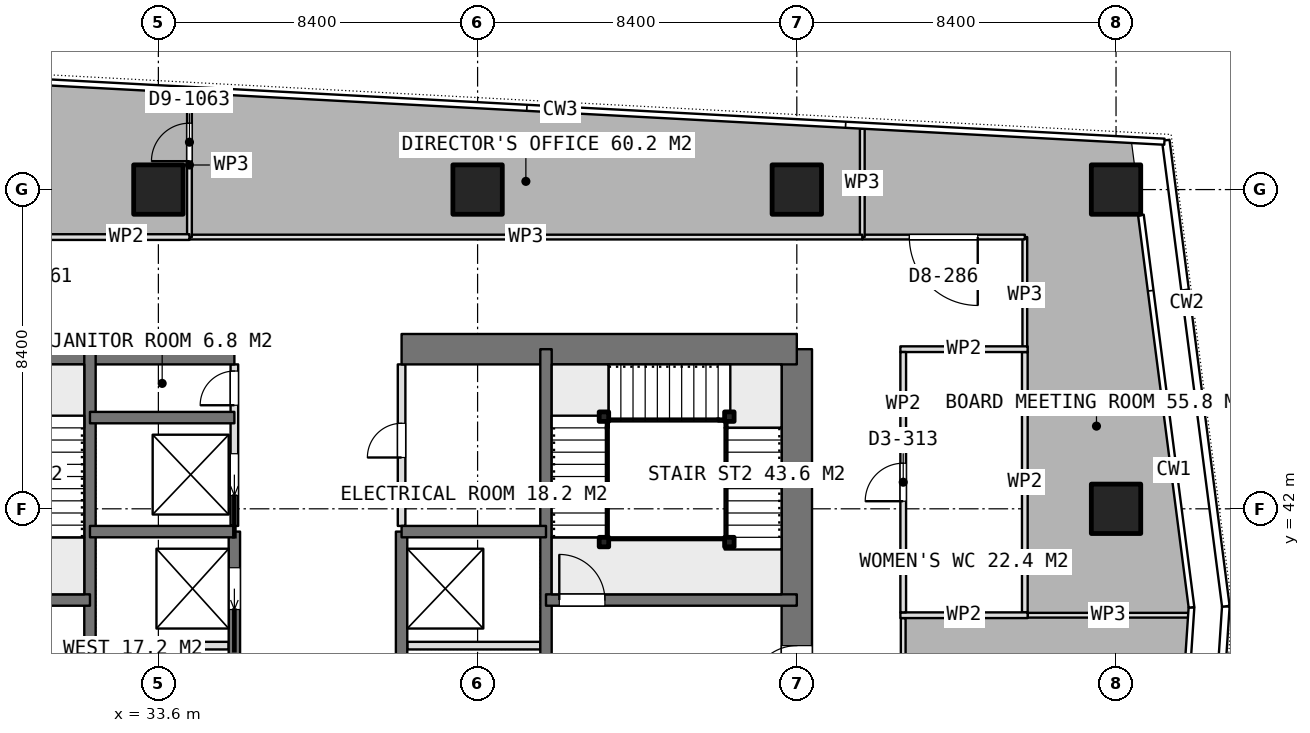
"""IFC4 building model, lengths in metres.
Left out: names, types, materials, properties, quantities, classifications, styles, units other than length and angle.
Written with IfcOpenShell. Run it as: python <this file> out.ifc"""

import sys

from ifc_helpers import new_model, si_unit, direction, frame, frame_2d, origin, origin_2d, place, context, subcontext, project, spatial, rectangle, extrude, element, fill, save


model = new_model("IFC4")
c1 = context("Model", 3, precision=1e-05, world=origin(), true_north=direction((0.0, 1.0)))
c2 = subcontext(c1, "Body", "Model", "MODEL_VIEW")
j1 = project(units=[si_unit("LENGTHUNIT", "METRE"), si_unit("PLANEANGLEUNIT", "RADIAN")], contexts=[c1])
p1 = place(None, origin())
s1 = spatial("IfcSite", under=j1, at=p1, CompositionType="ELEMENT")
p2 = place(p1, origin())
s2 = spatial("IfcBuilding", under=s1, at=p2, CompositionType="ELEMENT")
p3 = place(p2, frame((0.0, 0.0, 287.6)))
s3 = spatial("IfcBuildingStorey", under=s2, at=p3, CompositionType="ELEMENT", Elevation=287.6)
p4 = place(p3, frame((25.2, 46.2, 0.0), z_axis=(0.0, 0.0, 1.0), x_axis=(1.0, 0.0, 0.0)))
e1 = element("IfcWall", 1, at=p4, inside=s3, PredefinedType="SHEAR", context=c2, shape_type="SweptSolid", body=[
    extrude(rectangle(XDim=10.4, YDim=0.8, at=frame_2d((5.2, 0.0))), origin(), (0.0, 0.0, 1.0), 3.75),
])
p5 = place(p3, frame((40.0, 46.2, 0.0), z_axis=(0.0, 0.0, 1.0), x_axis=(1.0, 0.0, 0.0)))
e2 = element("IfcWall", 2, at=p5, inside=s3, PredefinedType="SHEAR", context=c2, shape_type="SweptSolid", body=[
    extrude(rectangle(XDim=10.4, YDim=0.8, at=frame_2d((5.2, 0.0))), origin(), (0.0, 0.0, 1.0), 3.75),
])
p6 = place(p3, frame((50.4, 21.0, 0.0), z_axis=(0.0, 0.0, 1.0), x_axis=(0.0, 1.0, 0.0)))
e3 = element("IfcWall", 3, at=p6, inside=s3, PredefinedType="SHEAR", context=c2, shape_type="SweptSolid", body=[
    extrude(rectangle(XDim=25.2, YDim=0.8, at=frame_2d((12.6, 0.0))), origin(), (0.0, 0.0, 1.0), 3.75),
])
p7 = place(p6, frame((16.2, 0.0, 0.0)))
e4 = element("IfcOpeningElement", 4, at=p7, cuts=e3, PredefinedType="OPENING", context=c2, shape_type="SweptSolid", body=[
    extrude(rectangle(XDim=1.2, YDim=2.1, at=frame_2d((0.6, 1.05))), frame((0.0, 0.41, 0.0), z_axis=(0.0, -1.0, 0.0), x_axis=(1.0, 0.0, 0.0)), (0.0, 0.0, 1.0), 0.82),
])
p8 = place(p6, frame((10.05, 0.0, 0.0)))
e5 = element("IfcOpeningElement", 5, at=p8, cuts=e3, PredefinedType="OPENING", context=c2, shape_type="SweptSolid", body=[
    extrude(rectangle(XDim=0.9, YDim=2.1, at=frame_2d((0.45, 1.05))), frame((0.0, 0.41, 0.0), z_axis=(0.0, -1.0, 0.0), x_axis=(1.0, 0.0, 0.0)), (0.0, 0.0, 1.0), 0.82),
])
p9 = place(p6, frame((7.45, 0.0, 0.0)))
e6 = element("IfcOpeningElement", 6, at=p9, cuts=e3, PredefinedType="OPENING", context=c2, shape_type="SweptSolid", body=[
    extrude(rectangle(XDim=0.9, YDim=2.1, at=frame_2d((0.45, 1.05))), frame((0.0, 0.41, 0.0), z_axis=(0.0, -1.0, 0.0), x_axis=(1.0, 0.0, 0.0)), (0.0, 0.0, 1.0), 0.82),
])
p10 = place(p6, frame((0.6, 0.0, 0.0)))
e7 = element("IfcOpeningElement", 7, at=p10, cuts=e3, PredefinedType="OPENING", context=c2, shape_type="SweptSolid", body=[
    extrude(rectangle(XDim=1.2, YDim=2.1, at=frame_2d((0.6, 1.05))), frame((0.0, 0.41, 0.0), z_axis=(0.0, -1.0, 0.0), x_axis=(1.0, 0.0, 0.0)), (0.0, 0.0, 1.0), 0.82),
])
for number, where, z_axis, x_axis in (
    (8, (31.8, 21.0, 0.0), (0.0, 0.0, 1.0), (0.0, 1.0, 0.0)),
    (9, (43.8, 21.0, 0.0), (0.0, 0.0, 1.0), (0.0, 1.0, 0.0)),
):
    element("IfcWall", number, at=place(p3, frame(where, z_axis=z_axis, x_axis=x_axis)), inside=s3, PredefinedType="SHEAR", context=c2, shape_type="SweptSolid", body=[
        extrude(rectangle(XDim=25.2, YDim=0.3, at=frame_2d((12.6, 0.0))), origin(), (0.0, 0.0, 1.0), 3.75),
    ])
p11 = place(p3, frame((35.6, 23.4, 0.0), z_axis=(0.0, 0.0, 1.0), x_axis=(0.0, 1.0, 0.0)))
e10 = element("IfcWall", 10, at=p11, inside=s3, PredefinedType="SHEAR", context=c2, shape_type="SweptSolid", body=[
    extrude(rectangle(XDim=18.0, YDim=0.3, at=frame_2d((9.0, 0.0))), origin(), (0.0, 0.0, 1.0), 3.75),
])
p12 = place(p11, frame((0.95, 0.0, 0.0)))
e11 = element("IfcOpeningElement", 11, at=p12, cuts=e10, PredefinedType="OPENING", context=c2, shape_type="SweptSolid", body=[
    extrude(rectangle(XDim=1.1, YDim=2.1, at=frame_2d((0.55, 1.05))), frame((0.0, 0.16, 0.0), z_axis=(0.0, -1.0, 0.0), x_axis=(1.0, 0.0, 0.0)), (0.0, 0.0, 1.0), 0.32),
])
p13 = place(p11, frame((3.95, 0.0, 0.0)))
e12 = element("IfcOpeningElement", 12, at=p13, cuts=e10, PredefinedType="OPENING", context=c2, shape_type="SweptSolid", body=[
    extrude(rectangle(XDim=1.1, YDim=2.1, at=frame_2d((0.55, 1.05))), frame((0.0, 0.16, 0.0), z_axis=(0.0, -1.0, 0.0), x_axis=(1.0, 0.0, 0.0)), (0.0, 0.0, 1.0), 0.32),
])
p14 = place(p11, frame((6.95, 0.0, 0.0)))
e13 = element("IfcOpeningElement", 13, at=p14, cuts=e10, PredefinedType="OPENING", context=c2, shape_type="SweptSolid", body=[
    extrude(rectangle(XDim=1.1, YDim=2.1, at=frame_2d((0.55, 1.05))), frame((0.0, 0.16, 0.0), z_axis=(0.0, -1.0, 0.0), x_axis=(1.0, 0.0, 0.0)), (0.0, 0.0, 1.0), 0.32),
])
p15 = place(p11, frame((9.95, 0.0, 0.0)))
e14 = element("IfcOpeningElement", 14, at=p15, cuts=e10, PredefinedType="OPENING", context=c2, shape_type="SweptSolid", body=[
    extrude(rectangle(XDim=1.1, YDim=2.1, at=frame_2d((0.55, 1.05))), frame((0.0, 0.16, 0.0), z_axis=(0.0, -1.0, 0.0), x_axis=(1.0, 0.0, 0.0)), (0.0, 0.0, 1.0), 0.32),
])
p16 = place(p11, frame((12.95, 0.0, 0.0)))
e15 = element("IfcOpeningElement", 15, at=p16, cuts=e10, PredefinedType="OPENING", context=c2, shape_type="SweptSolid", body=[
    extrude(rectangle(XDim=1.1, YDim=2.1, at=frame_2d((0.55, 1.05))), frame((0.0, 0.16, 0.0), z_axis=(0.0, -1.0, 0.0), x_axis=(1.0, 0.0, 0.0)), (0.0, 0.0, 1.0), 0.32),
])
p17 = place(p11, frame((15.95, 0.0, 0.0)))
e16 = element("IfcOpeningElement", 16, at=p17, cuts=e10, PredefinedType="OPENING", context=c2, shape_type="SweptSolid", body=[
    extrude(rectangle(XDim=1.1, YDim=2.1, at=frame_2d((0.55, 1.05))), frame((0.0, 0.16, 0.0), z_axis=(0.0, -1.0, 0.0), x_axis=(1.0, 0.0, 0.0)), (0.0, 0.0, 1.0), 0.32),
])
p18 = place(p3, frame((40.0, 23.4, 0.0), z_axis=(0.0, 0.0, 1.0), x_axis=(0.0, 1.0, 0.0)))
e17 = element("IfcWall", 17, at=p18, inside=s3, PredefinedType="SHEAR", context=c2, shape_type="SweptSolid", body=[
    extrude(rectangle(XDim=18.0, YDim=0.3, at=frame_2d((9.0, 0.0))), origin(), (0.0, 0.0, 1.0), 3.75),
])
p19 = place(p18, frame((2.55, 0.0, 0.0)))
e18 = element("IfcOpeningElement", 18, at=p19, cuts=e17, PredefinedType="OPENING", context=c2, shape_type="SweptSolid", body=[
    extrude(rectangle(XDim=0.9, YDim=2.1, at=frame_2d((0.45, 1.05))), frame((0.0, 0.16, 0.0), z_axis=(0.0, -1.0, 0.0), x_axis=(1.0, 0.0, 0.0)), (0.0, 0.0, 1.0), 0.32),
])
p20 = place(p18, frame((8.55, 0.0, 0.0)))
e19 = element("IfcOpeningElement", 19, at=p20, cuts=e17, PredefinedType="OPENING", context=c2, shape_type="SweptSolid", body=[
    extrude(rectangle(XDim=0.9, YDim=2.1, at=frame_2d((0.45, 1.05))), frame((0.0, 0.16, 0.0), z_axis=(0.0, -1.0, 0.0), x_axis=(1.0, 0.0, 0.0)), (0.0, 0.0, 1.0), 0.32),
])
for number, where, z_axis, x_axis in (
    (20, (31.8, 41.4, 0.0), (0.0, 0.0, 1.0), (1.0, 0.0, 0.0)),
    (21, (31.8, 44.4, 0.0), (0.0, 0.0, 1.0), (1.0, 0.0, 0.0)),
    (22, (40.0, 41.4, 0.0), (0.0, 0.0, 1.0), (1.0, 0.0, 0.0)),
):
    element("IfcWall", number, at=place(p3, frame(where, z_axis=z_axis, x_axis=x_axis)), inside=s3, PredefinedType="SHEAR", context=c2, shape_type="SweptSolid", body=[
        extrude(rectangle(XDim=3.8, YDim=0.3, at=frame_2d((1.9, 0.0))), origin(), (0.0, 0.0, 1.0), 3.75),
    ])
p21 = place(p3, frame((25.2, 39.6, 0.0), z_axis=(0.0, 0.0, 1.0), x_axis=(1.0, 0.0, 0.0)))
e23 = element("IfcWall", 23, at=p21, inside=s3, PredefinedType="SHEAR", context=c2, shape_type="SweptSolid", body=[
    extrude(rectangle(XDim=6.6, YDim=0.3, at=frame_2d((3.3, 0.0))), origin(), (0.0, 0.0, 1.0), 3.75),
])
p22 = place(p3, frame((43.8, 39.6, 0.0), z_axis=(0.0, 0.0, 1.0), x_axis=(1.0, 0.0, 0.0)))
e24 = element("IfcWall", 24, at=p22, inside=s3, PredefinedType="SHEAR", context=c2, shape_type="SweptSolid", body=[
    extrude(rectangle(XDim=6.6, YDim=0.3, at=frame_2d((3.3, 0.0))), origin(), (0.0, 0.0, 1.0), 3.75),
])
p23 = place(p22, frame((0.35, 0.0, 0.0)))
e25 = element("IfcOpeningElement", 25, at=p23, cuts=e24, PredefinedType="OPENING", context=c2, shape_type="SweptSolid", body=[
    extrude(rectangle(XDim=1.2, YDim=2.1, at=frame_2d((0.6, 1.05))), frame((0.0, 0.16, 0.0), z_axis=(0.0, -1.0, 0.0), x_axis=(1.0, 0.0, 0.0)), (0.0, 0.0, 1.0), 0.32),
])
for number, where, z_axis, x_axis in (
    (26, (33.6, 50.4, 0.0), (0.0, 0.0, 1.0), (1.0, 0.0, 0.0)),
    (27, (42.0, 50.4, 0.0), (0.0, 0.0, 1.0), (1.0, 0.0, 0.0)),
    (28, (50.4, 50.4, 0.0), (0.0, 0.0, 1.0), (1.0, 0.0, 0.0)),
    (29, (58.8, 42.0, 0.0), (0.0, 0.0, 1.0), (1.0, 0.0, 0.0)),
    (30, (58.8, 50.4, 0.0), (0.0, 0.0, 1.0), (1.0, 0.0, 0.0)),
):
    element("IfcColumn", number, at=place(p3, frame(where, z_axis=z_axis, x_axis=x_axis)), inside=s3, PredefinedType="COLUMN", context=c2, shape_type="SweptSolid", body=[
        extrude(rectangle(XDim=1.3, YDim=1.3, at=origin_2d()), origin(), (0.0, 0.0, 1.0), 3.75),
    ])
for number, where, z_axis, x_axis in (
    (31, (31.95, 38.4, 0.0), (0.0, 0.0, 1.0), (1.0, 0.0, 0.0)),
    (32, (40.15, 38.4, 0.0), (0.0, 0.0, 1.0), (1.0, 0.0, 0.0)),
):
    element("IfcWall", number, at=place(p3, frame(where, z_axis=z_axis, x_axis=x_axis)), inside=s3, PredefinedType="PARTITIONING", context=c2, shape_type="SweptSolid", body=[
        extrude(rectangle(XDim=3.5, YDim=0.2, at=frame_2d((1.75, 0.0))), origin(), (0.0, 0.0, 1.0), 3.45),
    ])
p24 = place(p3, frame((40.0, 41.55, 0.0), z_axis=(0.0, 0.0, 1.0), x_axis=(0.0, 1.0, 0.0)))
e33 = element("IfcWall", 33, at=p24, inside=s3, PredefinedType="PARTITIONING", context=c2, shape_type="SweptSolid", body=[
    extrude(rectangle(XDim=4.25, YDim=0.2, at=frame_2d((2.125, 0.0))), origin(), (0.0, 0.0, 1.0), 3.45),
])
p25 = place(p24, frame((1.8, 0.0, 0.0)))
e34 = element("IfcOpeningElement", 34, at=p25, cuts=e33, PredefinedType="OPENING", context=c2, shape_type="SweptSolid", body=[
    extrude(rectangle(XDim=0.9, YDim=2.1, at=frame_2d((0.45, 1.05))), frame((0.0, 0.11, 0.0), z_axis=(0.0, -1.0, 0.0), x_axis=(1.0, 0.0, 0.0)), (0.0, 0.0, 1.0), 0.22),
])
p26 = place(p3, frame((35.6, 41.55, 0.0), z_axis=(0.0, 0.0, 1.0), x_axis=(0.0, 1.0, 0.0)))
e35 = element("IfcWall", 35, at=p26, inside=s3, PredefinedType="PARTITIONING", context=c2, shape_type="SweptSolid", body=[
    extrude(rectangle(XDim=4.25, YDim=0.2, at=frame_2d((2.125, 0.0))), origin(), (0.0, 0.0, 1.0), 3.45),
])
p27 = place(p26, frame((3.175, 0.0, 0.0)))
e36 = element("IfcOpeningElement", 36, at=p27, cuts=e35, PredefinedType="OPENING", context=c2, shape_type="SweptSolid", body=[
    extrude(rectangle(XDim=0.9, YDim=2.1, at=frame_2d((0.45, 1.05))), frame((0.0, 0.11, 0.0), z_axis=(0.0, -1.0, 0.0), x_axis=(1.0, 0.0, 0.0)), (0.0, 0.0, 1.0), 0.22),
])
p28 = place(p26, frame((0.8, 0.0, 0.0)))
e37 = element("IfcOpeningElement", 37, at=p28, cuts=e35, PredefinedType="OPENING", context=c2, shape_type="SweptSolid", body=[
    extrude(rectangle(XDim=1.1, YDim=2.1, at=frame_2d((0.55, 1.05))), frame((0.0, 0.11, 0.0), z_axis=(0.0, -1.0, 0.0), x_axis=(1.0, 0.0, 0.0)), (0.0, 0.0, 1.0), 0.22),
])
for number, where, z_axis, x_axis in (
    (38, (53.125, 39.2, 0.0), (0.0, 0.0, 1.0), (1.0, 0.0, 0.0)),
    (39, (53.125, 46.2, 0.0), (0.0, 0.0, 1.0), (1.0, 0.0, 0.0)),
):
    element("IfcWall", number, at=place(p3, frame(where, z_axis=z_axis, x_axis=x_axis)), inside=s3, PredefinedType="PARTITIONING", context=c2, shape_type="SweptSolid", body=[
        extrude(rectangle(XDim=3.35, YDim=0.15, at=frame_2d((1.675, 0.0))), origin(), (0.0, 0.0, 1.0), 3.45),
    ])
p29 = place(p3, frame((53.2, 39.275, 0.0), z_axis=(0.0, 0.0, 1.0), x_axis=(0.0, 1.0, 0.0)))
e40 = element("IfcWall", 40, at=p29, inside=s3, PredefinedType="PARTITIONING", context=c2, shape_type="SweptSolid", body=[
    extrude(rectangle(XDim=6.85, YDim=0.15, at=frame_2d((3.425, 0.0))), origin(), (0.0, 0.0, 1.0), 3.45),
])
p30 = place(p29, frame((2.925, 0.0, 0.0)))
e41 = element("IfcOpeningElement", 41, at=p30, cuts=e40, PredefinedType="OPENING", context=c2, shape_type="SweptSolid", body=[
    extrude(rectangle(XDim=1.0, YDim=2.1, at=frame_2d((0.5, 1.05))), frame((0.0, 0.085, 0.0), z_axis=(0.0, -1.0, 0.0), x_axis=(1.0, 0.0, 0.0)), (0.0, 0.0, 1.0), 0.17),
])
p31 = place(p3, frame((56.4, 39.275, 0.0), z_axis=(0.0, 0.0, 1.0), x_axis=(0.0, 1.0, 0.0)))
e42 = element("IfcWall", 42, at=p31, inside=s3, PredefinedType="PARTITIONING", context=c2, shape_type="SweptSolid", body=[
    extrude(rectangle(XDim=6.85, YDim=0.15, at=frame_2d((3.425, 0.0))), origin(), (0.0, 0.0, 1.0), 3.45),
])
p32 = place(p3, frame((53.2, 28.075, 0.0), z_axis=(0.0, 0.0, 1.0), x_axis=(0.0, 1.0, 0.0)))
e43 = element("IfcWall", 43, at=p32, inside=s3, PredefinedType="PARTITIONING", context=c2, shape_type="SweptSolid", body=[
    extrude(rectangle(XDim=11.05, YDim=0.125, at=frame_2d((5.525, 0.0))), origin(), (0.0, 0.0, 1.0), 3.45),
])
p33 = place(p32, frame((5.025, 0.0, 0.0)))
e44 = element("IfcOpeningElement", 44, at=p33, cuts=e43, PredefinedType="OPENING", context=c2, shape_type="SweptSolid", body=[
    extrude(rectangle(XDim=1.0, YDim=2.1, at=frame_2d((0.5, 1.05))), frame((0.0, 0.073, 0.0), z_axis=(0.0, -1.0, 0.0), x_axis=(1.0, 0.0, 0.0)), (0.0, 0.0, 1.0), 0.145),
])
p34 = place(p3, frame((56.476, 39.2, 0.0), z_axis=(0.0, 0.0, 1.0), x_axis=(1.0, 0.0, 0.0)))
e45 = element("IfcWall", 45, at=p34, inside=s3, PredefinedType="PARTITIONING", context=c2, shape_type="SweptSolid", body=[
    extrude(rectangle(XDim=4.246, YDim=0.125, at=frame_2d((2.123, 0.0))), origin(), (0.0, 0.0, 1.0), 3.45),
])
p35 = place(p3, frame((56.4, 46.125, 0.0), z_axis=(0.0, 0.0, 1.0), x_axis=(0.0, 1.0, 0.0)))
e46 = element("IfcWall", 46, at=p35, inside=s3, PredefinedType="PARTITIONING", context=c2, shape_type="SweptSolid", body=[
    extrude(rectangle(XDim=3.025, YDim=0.125, at=frame_2d((1.512, 0.0))), origin(), (0.0, 0.0, 1.0), 3.45),
])
p36 = place(p3, frame((56.4, 49.15, 0.0), z_axis=(0.0, 0.0, 1.0), x_axis=(-1.0, 0.0, 0.0)))
e47 = element("IfcWall", 47, at=p36, inside=s3, PredefinedType="PARTITIONING", context=c2, shape_type="SweptSolid", body=[
    extrude(rectangle(XDim=4.277, YDim=0.125, at=frame_2d((2.138, 0.0))), origin(), (0.0, 0.0, 1.0), 3.45),
])
p37 = place(p36, frame((1.239, 0.0, 0.0)))
e48 = element("IfcOpeningElement", 48, at=p37, cuts=e47, PredefinedType="OPENING", context=c2, shape_type="SweptSolid", body=[
    extrude(rectangle(XDim=1.8, YDim=2.1, at=frame_2d((0.9, 1.05))), frame((0.0, 0.073, 0.0), z_axis=(0.0, -1.0, 0.0), x_axis=(1.0, 0.0, 0.0)), (0.0, 0.0, 1.0), 0.145),
])
p38 = place(p3, frame((52.123, 49.15, 0.0), z_axis=(0.0, 0.0, 1.0), x_axis=(0.0, 1.0, 0.0)))
e49 = element("IfcWall", 49, at=p38, inside=s3, PredefinedType="PARTITIONING", context=c2, shape_type="SweptSolid", body=[
    extrude(rectangle(XDim=2.852, YDim=0.125, at=frame_2d((1.426, 0.0))), origin(), (0.0, 0.0, 1.0), 3.45),
])
p39 = place(p3, frame((52.123, 49.15, 0.0), z_axis=(0.0, 0.0, 1.0), x_axis=(-1.0, 0.0, 0.0)))
e50 = element("IfcWall", 50, at=p39, inside=s3, PredefinedType="PARTITIONING", context=c2, shape_type="SweptSolid", body=[
    extrude(rectangle(XDim=17.705, YDim=0.125, at=frame_2d((8.853, 0.0))), origin(), (0.0, 0.0, 1.0), 3.45),
])
p40 = place(p3, frame((34.418, 49.15, 0.0), z_axis=(0.0, 0.0, 1.0), x_axis=(0.0, 1.0, 0.0)))
e51 = element("IfcWall", 51, at=p40, inside=s3, PredefinedType="PARTITIONING", context=c2, shape_type="SweptSolid", body=[
    extrude(rectangle(XDim=3.793, YDim=0.125, at=frame_2d((1.896, 0.0))), origin(), (0.0, 0.0, 1.0), 3.45),
])
p41 = place(p40, frame((1.997, 0.0, 0.0)))
e52 = element("IfcOpeningElement", 52, at=p41, cuts=e51, PredefinedType="OPENING", context=c2, shape_type="SweptSolid", body=[
    extrude(rectangle(XDim=1.0, YDim=2.1, at=frame_2d((0.5, 1.05))), frame((0.0, 0.073, 0.0), z_axis=(0.0, -1.0, 0.0), x_axis=(1.0, 0.0, 0.0)), (0.0, 0.0, 1.0), 0.145),
])
p42 = place(p3, frame((34.418, 49.15, 0.0), z_axis=(0.0, 0.0, 1.0), x_axis=(-1.0, 0.0, 0.0)))
e53 = element("IfcWall", 53, at=p42, inside=s3, PredefinedType="PARTITIONING", context=c2, shape_type="SweptSolid", body=[
    extrude(rectangle(XDim=8.299, YDim=0.15, at=frame_2d((4.149, 0.0))), origin(), (0.0, 0.0, 1.0), 3.45),
])
p43 = place(p42, frame((3.649, 0.0, 0.0)))
e54 = element("IfcOpeningElement", 54, at=p43, cuts=e53, PredefinedType="OPENING", context=c2, shape_type="SweptSolid", body=[
    extrude(rectangle(XDim=1.0, YDim=2.1, at=frame_2d((0.5, 1.05))), frame((0.0, 0.085, 0.0), z_axis=(0.0, -1.0, 0.0), x_axis=(1.0, 0.0, 0.0)), (0.0, 0.0, 1.0), 0.17),
])
for number, where, z_axis, x_axis in (
    (55, (45.325, 41.125, 0.0), (0.0, 0.0, 1.0), (1.0, 0.0, 0.0)),
    (56, (45.325, 44.425, 0.0), (0.0, 0.0, 1.0), (1.0, 0.0, 0.0)),
    (57, (48.625, 44.425, 0.0), (0.0, 0.0, 1.0), (1.0, 0.0, 0.0)),
    (58, (48.625, 41.125, 0.0), (0.0, 0.0, 1.0), (1.0, 0.0, 0.0)),
):
    element("IfcColumn", number, at=place(p3, frame(where, z_axis=z_axis, x_axis=x_axis)), inside=s3, PredefinedType="COLUMN", context=c2, shape_type="SweptSolid", body=[
        extrude(rectangle(XDim=0.25, YDim=0.25, at=origin_2d()), origin(), (0.0, 0.0, 1.0), 3.75),
    ])
p44 = place(p7, origin())
e59 = element("IfcDoor", 59, at=p44, inside=s3, OperationType="SINGLE_SWING_LEFT", PredefinedType="DOOR", context=c2, shape_type="SweptSolid", body=[
    extrude(rectangle(XDim=1.2, YDim=2.1, at=frame_2d((0.6, 1.05))), frame((0.0, 0.025, 0.0), z_axis=(0.0, -1.0, 0.0), x_axis=(1.0, 0.0, 0.0)), (0.0, 0.0, 1.0), 0.05),
])
fill(e4, e59)
p45 = place(p25, origin())
e60 = element("IfcDoor", 60, at=p45, inside=s3, OperationType="SINGLE_SWING_LEFT", PredefinedType="DOOR", context=c2, shape_type="SweptSolid", body=[
    extrude(rectangle(XDim=0.9, YDim=2.1, at=frame_2d((0.45, 1.05))), frame((0.0, 0.025, 0.0), z_axis=(0.0, -1.0, 0.0), x_axis=(1.0, 0.0, 0.0)), (0.0, 0.0, 1.0), 0.05),
])
fill(e34, e60)
p46 = place(p27, origin())
e61 = element("IfcDoor", 61, at=p46, inside=s3, OperationType="SINGLE_SWING_LEFT", PredefinedType="DOOR", context=c2, shape_type="SweptSolid", body=[
    extrude(rectangle(XDim=0.9, YDim=2.1, at=frame_2d((0.45, 1.05))), frame((0.0, 0.025, 0.0), z_axis=(0.0, -1.0, 0.0), x_axis=(1.0, 0.0, 0.0)), (0.0, 0.0, 1.0), 0.05),
])
fill(e36, e61)
p47 = place(p17, origin())
e62 = element("IfcDoor", 62, at=p47, inside=s3, OperationType="SLIDING_TO_LEFT", PredefinedType="USERDEFINED", context=c2, shape_type="SweptSolid", body=[
    extrude(rectangle(XDim=1.1, YDim=2.1, at=frame_2d((0.55, 1.05))), frame((0.0, 0.025, 0.0), z_axis=(0.0, -1.0, 0.0), x_axis=(1.0, 0.0, 0.0)), (0.0, 0.0, 1.0), 0.05),
])
fill(e16, e62)
p48 = place(p28, origin())
e63 = element("IfcDoor", 63, at=p48, inside=s3, OperationType="SLIDING_TO_LEFT", PredefinedType="USERDEFINED", context=c2, shape_type="SweptSolid", body=[
    extrude(rectangle(XDim=1.1, YDim=2.1, at=frame_2d((0.55, 1.05))), frame((0.0, 0.025, 0.0), z_axis=(0.0, -1.0, 0.0), x_axis=(1.0, 0.0, 0.0)), (0.0, 0.0, 1.0), 0.05),
])
fill(e37, e63)
p49 = place(p30, origin())
e64 = element("IfcDoor", 64, at=p49, inside=s3, OperationType="SINGLE_SWING_LEFT", PredefinedType="DOOR", context=c2, shape_type="SweptSolid", body=[
    extrude(rectangle(XDim=1.0, YDim=2.1, at=frame_2d((0.5, 1.05))), frame((0.0, 0.025, 0.0), z_axis=(0.0, -1.0, 0.0), x_axis=(1.0, 0.0, 0.0)), (0.0, 0.0, 1.0), 0.05),
])
fill(e41, e64)
p50 = place(p37, origin())
e65 = element("IfcDoor", 65, at=p50, inside=s3, OperationType="DOUBLE_DOOR_SINGLE_SWING", PredefinedType="DOOR", context=c2, shape_type="SweptSolid", body=[
    extrude(rectangle(XDim=1.8, YDim=2.1, at=frame_2d((0.9, 1.05))), frame((0.0, 0.025, 0.0), z_axis=(0.0, -1.0, 0.0), x_axis=(1.0, 0.0, 0.0)), (0.0, 0.0, 1.0), 0.05),
])
fill(e48, e65)
p51 = place(p41, origin())
e66 = element("IfcDoor", 66, at=p51, inside=s3, OperationType="SINGLE_SWING_LEFT", PredefinedType="DOOR", context=c2, shape_type="SweptSolid", body=[
    extrude(rectangle(XDim=1.0, YDim=2.1, at=frame_2d((0.5, 1.05))), frame((0.0, 0.025, 0.0), z_axis=(0.0, -1.0, 0.0), x_axis=(1.0, 0.0, 0.0)), (0.0, 0.0, 1.0), 0.05),
])
fill(e52, e66)
p52 = place(p23, origin())
e67 = element("IfcDoor", 67, at=p52, inside=s3, OperationType="SINGLE_SWING_RIGHT", PredefinedType="DOOR", context=c2, shape_type="SweptSolid", body=[
    extrude(rectangle(XDim=1.2, YDim=2.1, at=frame_2d((0.6, 1.05))), frame((0.0, 0.025, 0.0), z_axis=(0.0, -1.0, 0.0), x_axis=(1.0, 0.0, 0.0)), (0.0, 0.0, 1.0), 0.05),
])
fill(e25, e67)
save(model, sys.argv[1])
